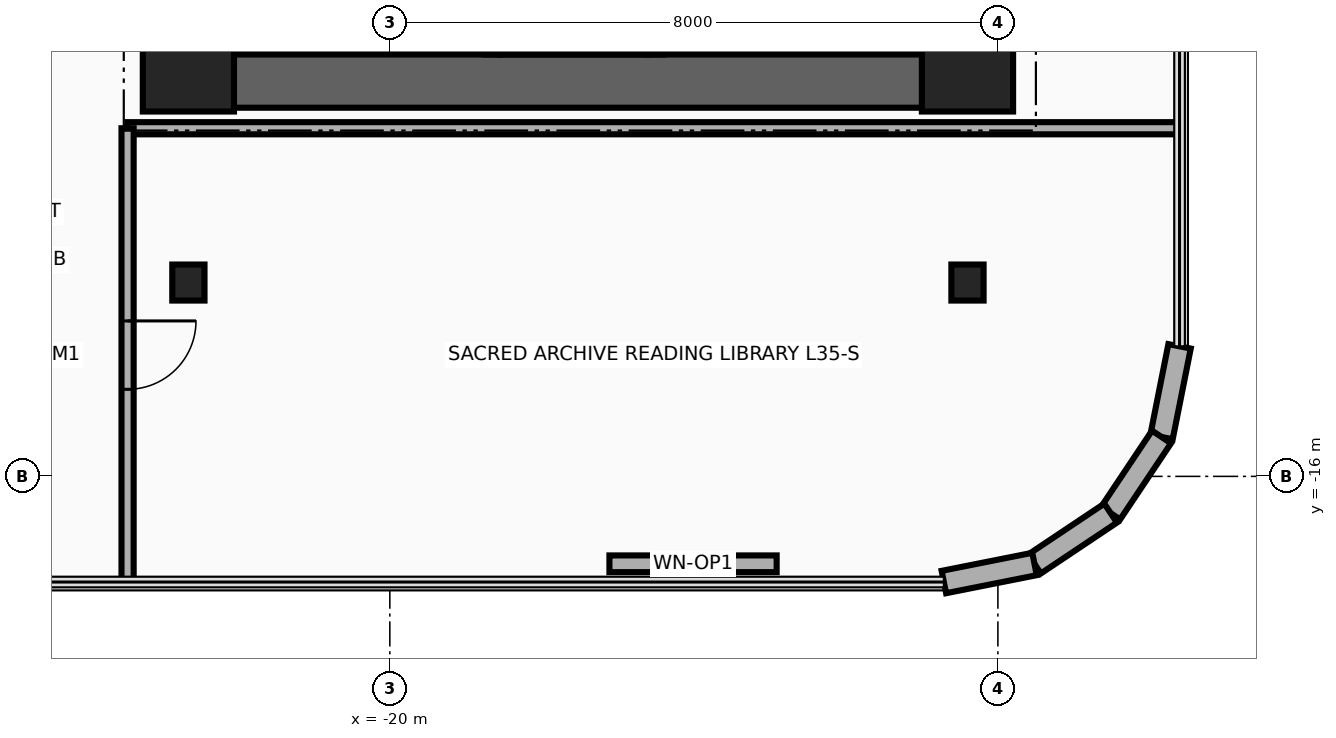
"""IFC4 building model, lengths in metres.
Left out: names, types, materials, properties, quantities, classifications, styles, units other than length and angle.
Written with IfcOpenShell. Run it as: python <this file> out.ifc"""

import sys

from ifc_helpers import new_model, si_unit, direction, frame, frame_2d, origin, origin_2d, place, context, subcontext, project, spatial, rectangle, i_section, extrude, source, transform, mapped, element, fill, save


model = new_model("IFC4")
c1 = context("Model", 3, precision=1e-05, world=origin(), true_north=direction((0.0, 1.0)))
c2 = subcontext(c1, "Body", "Model", "MODEL_VIEW")
j1 = project(units=[si_unit("LENGTHUNIT", "METRE"), si_unit("PLANEANGLEUNIT", "RADIAN")], contexts=[c1])
p1 = place(None, origin())
s1 = spatial("IfcSite", under=j1, at=p1, CompositionType="ELEMENT")
p2 = place(p1, origin())
s2 = spatial("IfcBuilding", under=s1, at=p2, CompositionType="ELEMENT")
p3 = place(p2, frame((0.0, 0.0, 139.0)))
s3 = spatial("IfcBuildingStorey", under=s2, at=p3, CompositionType="ELEMENT", Elevation=139.0)
for number, where, z_axis, x_axis in (
    (1, (-22.16, -10.45, 0.0), (0.0, 0.0, 1.0), (0.0, 1.0, 0.0)),
    (2, (-18.83, -10.45, 0.0), (0.0, 0.0, 1.0), (0.0, 1.0, 0.0)),
):
    element("IfcWall", number, at=place(p3, frame(where, z_axis=z_axis, x_axis=x_axis)), inside=s3, PredefinedType="SHEAR", context=c2, shape_type="SweptSolid", body=[
        extrude(rectangle(XDim=8.67, YDim=0.22, at=frame_2d((4.335, 0.0))), origin(), (0.0, 0.0, 1.0), 3.46),
    ])
p4 = place(p3, frame((-22.65, -11.15, 0.0), z_axis=(0.0, 0.0, 1.0), x_axis=(0.0, 1.0, 0.0)))
e3 = element("IfcWall", 3, at=p4, inside=s3, PredefinedType="SHEAR", context=c2, shape_type="SweptSolid", body=[
    extrude(rectangle(XDim=22.3, YDim=0.7, at=frame_2d((11.15, 0.0))), origin(), (0.0, 0.0, 1.0), 3.46),
])
p5 = place(p3, frame((-22.65, -10.8, 0.0), z_axis=(0.0, 0.0, 1.0), x_axis=(1.0, 0.0, 0.0)))
e4 = element("IfcWall", 4, at=p5, inside=s3, PredefinedType="SHEAR", context=c2, shape_type="SweptSolid", body=[
    extrude(rectangle(XDim=10.25, YDim=0.7, at=frame_2d((5.125, 0.0))), origin(), (0.0, 0.0, 1.0), 3.46),
])
m1 = source(origin(), c2, "Body", "SweptSolid", [
    extrude(rectangle(XDim=1.2, YDim=1.2, at=origin_2d()), origin(), (0.0, 0.0, 1.0), 3.7),
])
for number, where, z_axis, x_axis in (
    (5, (-22.65, -10.6, 0.0), (0.0, 0.0, 1.0), (1.0, 0.0, 0.0)),
    (6, (-12.4, -10.6, 0.0), (0.0, 0.0, 1.0), (1.0, 0.0, 0.0)),
):
    element("IfcColumn", number, at=place(p3, frame(where, z_axis=z_axis, x_axis=x_axis)), inside=s3, PredefinedType="COLUMN", context=c2, shape_type="MappedRepresentation", body=[
        mapped(m1, transform((0.0, 0.0, 0.0), x_axis=(1.0, 0.0, 0.0), y_axis=(0.0, 1.0, 0.0), z_axis=(0.0, 0.0, 1.0), scale=1.0)),
    ])
m2 = source(origin(), c2, "Body", "SweptSolid", [
    extrude(i_section(OverallWidth=0.424, OverallDepth=0.474, WebThickness=0.048, FlangeThickness=0.077, at=origin_2d()), origin(), (0.0, 0.0, 1.0), 3.7),
])
for number, where, z_axis, x_axis in (
    (7, (-22.65, -13.45, 0.0), (0.0, 0.0, 1.0), (1.0, 0.0, 0.0)),
    (8, (-12.4, -13.45, 0.0), (0.0, 0.0, 1.0), (1.0, 0.0, 0.0)),
):
    element("IfcColumn", number, at=place(p3, frame(where, z_axis=z_axis, x_axis=x_axis)), inside=s3, PredefinedType="COLUMN", context=c2, shape_type="MappedRepresentation", body=[
        mapped(m2, transform((0.0, 0.0, 0.0), x_axis=(1.0, 0.0, 0.0), y_axis=(0.0, 1.0, 0.0), z_axis=(0.0, 0.0, 1.0), scale=1.0)),
    ])
p6 = place(p3, frame((-9.61, -14.289, 0.0), z_axis=(0.0, 0.0, 1.0), x_axis=(-0.194996050505, -0.980804027463, 0.0)))
e9 = element("IfcWall", 9, at=p6, inside=s3, PredefinedType="SOLIDWALL", context=c2, shape_type="SweptSolid", body=[
    extrude(rectangle(XDim=1.216, YDim=0.3, at=frame_2d((0.608, 0.0))), origin(), (0.0, 0.0, 1.0), 3.46),
])
for number, where, z_axis, x_axis in (
    (10, (-9.847, -15.482, 0.0), (0.0, 0.0, 1.0), (-0.556, -0.831, 0.0)),
    (11, (-10.517, -16.483, 0.0), (0.0, 0.0, 1.0), (-0.831, -0.556, 0.0)),
):
    element("IfcWall", number, at=place(p3, frame(where, z_axis=z_axis, x_axis=x_axis)), inside=s3, PredefinedType="SOLIDWALL", context=c2, shape_type="SweptSolid", body=[
        extrude(rectangle(XDim=1.205, YDim=0.3, at=frame_2d((0.603, 0.0))), origin(), (0.0, 0.0, 1.0), 3.46),
    ])
p7 = place(p3, frame((-11.518, -17.153, 0.0), z_axis=(0.0, 0.0, 1.0), x_axis=(-0.980804027463, -0.194996050505, 0.0)))
e12 = element("IfcWall", 12, at=p7, inside=s3, PredefinedType="SOLIDWALL", context=c2, shape_type="SweptSolid", body=[
    extrude(rectangle(XDim=1.216, YDim=0.3, at=frame_2d((0.608, 0.0))), origin(), (0.0, 0.0, 1.0), 3.46),
])
p8 = place(p3, frame((-14.911, -17.15, 0.0), z_axis=(0.0, 0.0, 1.0), x_axis=(-1.0, 0.0, 0.0)))
e13 = element("IfcWall", 13, at=p8, inside=s3, PredefinedType="SOLIDWALL", context=c2, shape_type="SweptSolid", body=[
    extrude(rectangle(XDim=2.2, YDim=0.22, at=frame_2d((1.1, 0.0))), origin(), (0.0, 0.0, 1.0), 3.46),
])
p9 = place(p8, frame((0.65, 0.0, 0.95)))
e14 = element("IfcOpeningElement", 14, at=p9, cuts=e13, PredefinedType="OPENING", context=c2, shape_type="SweptSolid", body=[
    extrude(rectangle(XDim=0.9, YDim=1.3, at=frame_2d((0.45, 0.65))), frame((0.0, 0.125, 0.0), z_axis=(0.0, -1.0, 0.0), x_axis=(1.0, 0.0, 0.0)), (0.0, 0.0, 1.0), 0.25),
])
for number, where, z_axis, x_axis in (
    (15, (-18.65, -10.45, 0.0), (0.0, 0.0, 1.0), (0.0, 1.0, 0.0)),
    (16, (-16.5, -10.45, 0.0), (0.0, 0.0, 1.0), (0.0, 1.0, 0.0)),
):
    element("IfcWall", number, at=place(p3, frame(where, z_axis=z_axis, x_axis=x_axis)), inside=s3, PredefinedType="MOVABLE", context=c2, shape_type="SweptSolid", body=[
        extrude(rectangle(XDim=2.35, YDim=0.2, at=frame_2d((1.175, 0.0))), origin(), (0.0, 0.0, 1.0), 2.666),
    ])
p10 = place(p3, frame((-18.55, -10.35, 0.0), z_axis=(0.0, 0.0, 1.0), x_axis=(1.0, 0.0, 0.0)))
e17 = element("IfcWall", 17, at=p10, inside=s3, PredefinedType="MOVABLE", context=c2, shape_type="SweptSolid", body=[
    extrude(rectangle(XDim=1.95, YDim=0.2, at=frame_2d((0.975, 0.0))), origin(), (0.0, 0.0, 1.0), 2.666),
])
p11 = place(p3, frame((-23.45, -11.42, 0.0), z_axis=(0.0, 0.0, 1.0), x_axis=(1.0, 0.0, 0.0)))
e18 = element("IfcWall", 18, at=p11, inside=s3, PredefinedType="PARTITIONING", context=c2, shape_type="SweptSolid", body=[
    extrude(rectangle(XDim=13.84, YDim=0.16, at=frame_2d((6.92, 0.0))), origin(), (0.0, 0.0, 1.0), 2.834),
])
p12 = place(p3, frame((-23.45, -17.39, 0.0), z_axis=(0.0, 0.0, 1.0), x_axis=(0.0, 1.0, 0.0)))
e19 = element("IfcWall", 19, at=p12, inside=s3, PredefinedType="PARTITIONING", context=c2, shape_type="SweptSolid", body=[
    extrude(rectangle(XDim=5.97, YDim=0.16, at=frame_2d((2.985, 0.0))), origin(), (0.0, 0.0, 1.0), 3.46),
])
p13 = place(p12, frame((2.535, 0.0, 0.0)))
e20 = element("IfcOpeningElement", 20, at=p13, cuts=e19, PredefinedType="OPENING", context=c2, shape_type="SweptSolid", body=[
    extrude(rectangle(XDim=0.9, YDim=2.1, at=frame_2d((0.45, 1.05))), frame((0.0, 0.095, 0.0), z_axis=(0.0, -1.0, 0.0), x_axis=(1.0, 0.0, 0.0)), (0.0, 0.0, 1.0), 0.19),
])
p14 = place(p9, origin())
e21 = element("IfcWindow", 21, at=p14, inside=s3, PartitioningType="SINGLE_PANEL", PredefinedType="WINDOW", context=c2, shape_type="SweptSolid", body=[
    extrude(rectangle(XDim=0.9, YDim=1.3, at=frame_2d((0.45, 0.65))), frame((0.0, 0.03, 0.0), z_axis=(0.0, -1.0, 0.0), x_axis=(1.0, 0.0, 0.0)), (0.0, 0.0, 1.0), 0.06),
])
fill(e14, e21)
p15 = place(p13, frame((0.9, 0.0, 0.0), z_axis=(0.0, 0.0, 1.0), x_axis=(-1.0, 0.0, 0.0)))
e22 = element("IfcDoor", 22, at=p15, inside=s3, OperationType="SINGLE_SWING_LEFT", PredefinedType="DOOR", context=c2, shape_type="SweptSolid", body=[
    extrude(rectangle(XDim=0.9, YDim=2.1, at=frame_2d((0.45, 1.05))), frame((0.0, 0.025, 0.0), z_axis=(0.0, -1.0, 0.0), x_axis=(1.0, 0.0, 0.0)), (0.0, 0.0, 1.0), 0.05),
])
fill(e20, e22)
save(model, sys.argv[1])
